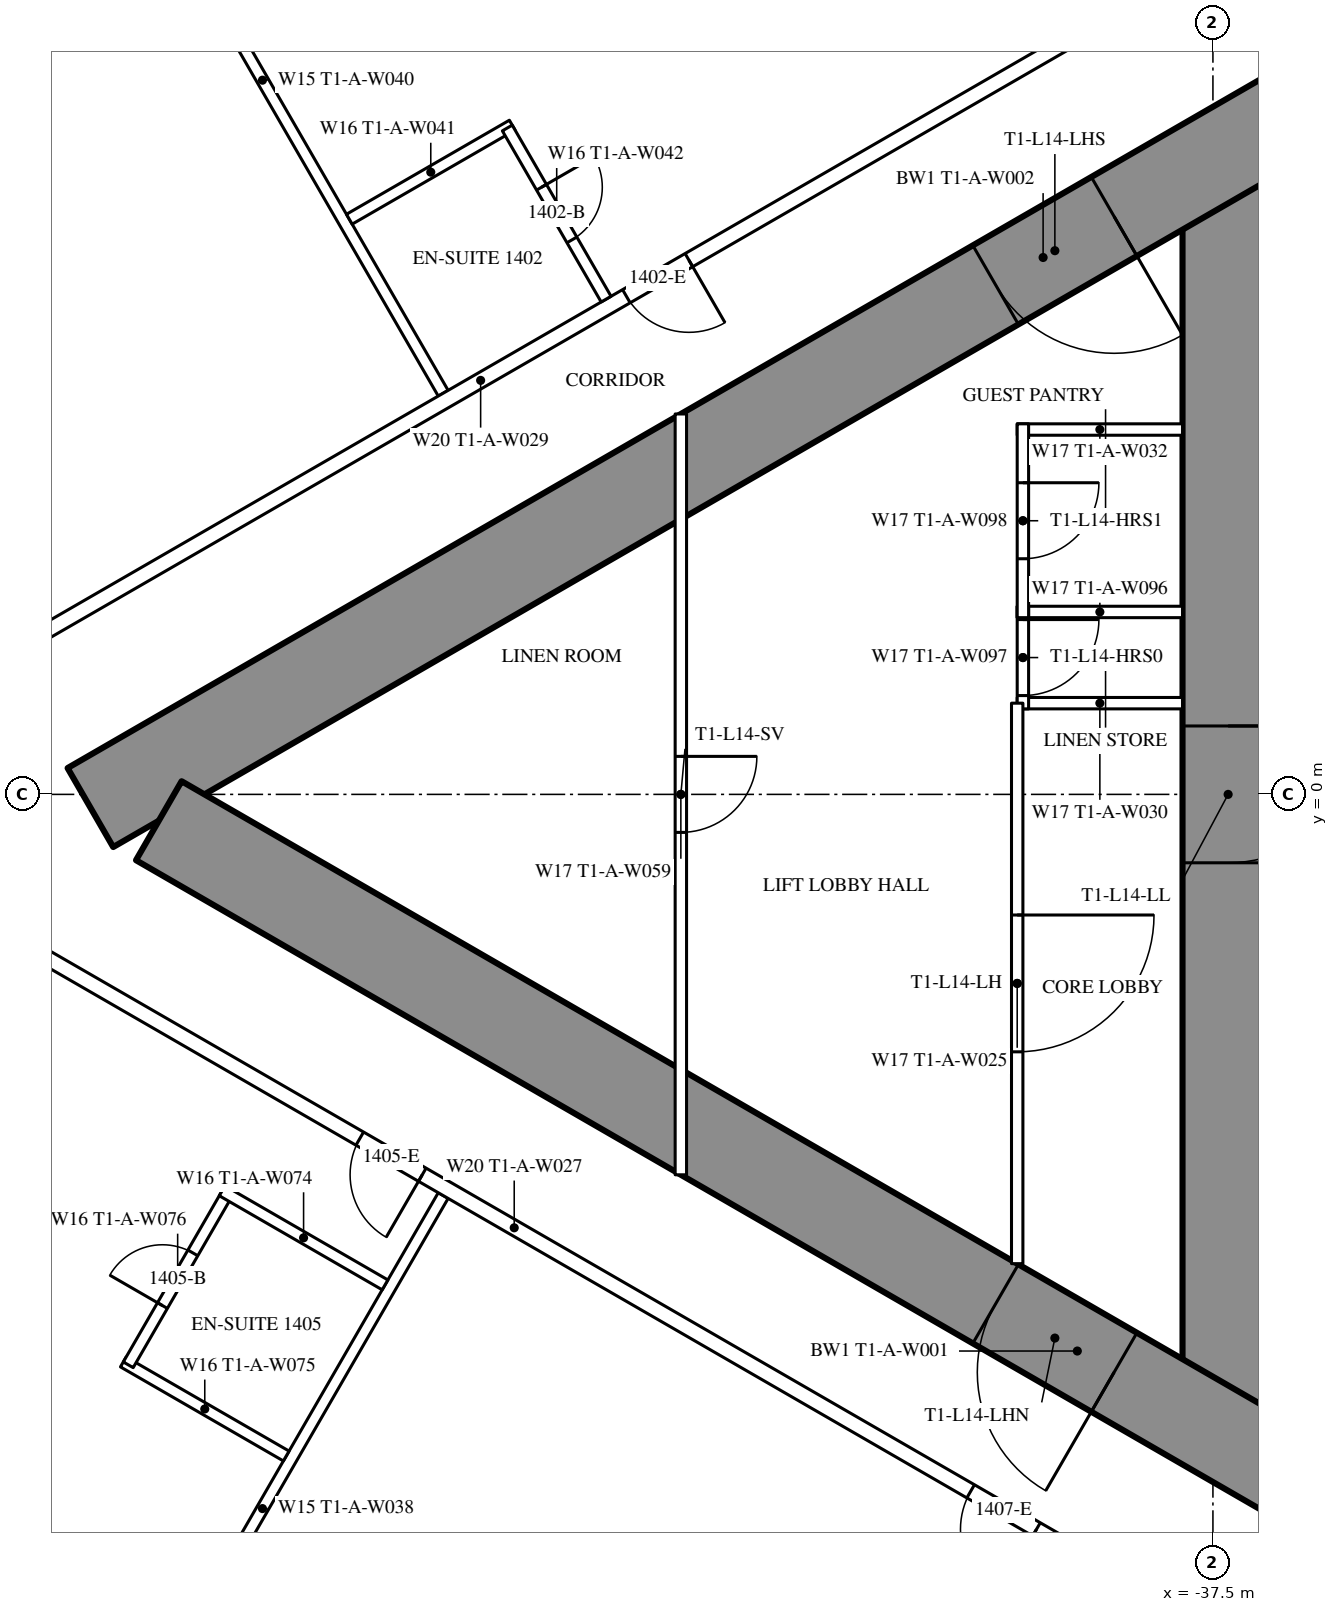
"""IFC4 building model, lengths in metres.
Left out: names, types, materials, properties, quantities, classifications, styles, units other than length and angle.
Written with IfcOpenShell. Run it as: python <this file> out.ifc"""

import sys

from ifc_helpers import new_model, si_unit, direction, frame, frame_2d, origin, place, context, subcontext, project, spatial, rectangle, extrude, element, fill, save


model = new_model("IFC4")
c1 = context("Model", 3, precision=1e-05, world=origin(), true_north=direction((0.0, 1.0)))
c2 = subcontext(c1, "Body", "Model", "MODEL_VIEW")
j1 = project(units=[si_unit("LENGTHUNIT", "METRE"), si_unit("PLANEANGLEUNIT", "RADIAN")], contexts=[c1])
p1 = place(None, origin())
s1 = spatial("IfcSite", under=j1, at=p1, CompositionType="ELEMENT")
p2 = place(p1, origin())
s2 = spatial("IfcBuilding", under=s1, at=p2, CompositionType="ELEMENT")
p3 = place(p2, frame((0.0, 0.0, 56.5)))
s3 = spatial("IfcBuildingStorey", under=s2, at=p3, CompositionType="ELEMENT", Elevation=56.5)
p4 = place(p3, frame((-37.3, 8.6, 0.0), z_axis=(0.0, 0.0, 1.0), x_axis=(0.0, -1.0, 0.0)))
e1 = element("IfcWall", 1, at=p4, inside=s3, PredefinedType="SHEAR", context=c2, shape_type="SweptSolid", body=[
    extrude(rectangle(XDim=17.2, YDim=1.2, at=frame_2d((8.6, 0.0))), origin(), (0.0, 0.0, 1.0), 3.5),
])
p5 = place(p4, frame((7.7, 0.0, 0.0)))
e2 = element("IfcOpeningElement", 2, at=p5, cuts=e1, PredefinedType="OPENING", context=c2, shape_type="SweptSolid", body=[
    extrude(rectangle(XDim=1.8, YDim=2.2, at=frame_2d((0.9, 1.1))), frame((0.0, 0.61, 0.0), z_axis=(0.0, -1.0, 0.0), x_axis=(1.0, 0.0, 0.0)), (0.0, 0.0, 1.0), 1.22),
])
p6 = place(p3, frame((-27.2, 14.3, 0.0), z_axis=(0.0, 0.0, 1.0), x_axis=(-0.866026593062, -0.499997940104, 0.0)))
e3 = element("IfcWall", 3, at=p6, inside=s3, PredefinedType="SHEAR", context=c2, shape_type="SweptSolid", body=[
    extrude(rectangle(XDim=28.946, YDim=1.2, at=frame_2d((14.473, 0.0))), origin(), (0.0, 0.0, 1.0), 3.5),
])
p7 = place(p6, frame((4.6, 0.0, 0.0)))
e4 = element("IfcOpeningElement", 4, at=p7, cuts=e3, PredefinedType="OPENING", context=c2, shape_type="SweptSolid", body=[
    extrude(rectangle(XDim=1.0, YDim=2.2, at=frame_2d((0.5, 1.1))), frame((0.0, 0.61, 0.0), z_axis=(0.0, -1.0, 0.0), x_axis=(1.0, 0.0, 0.0)), (0.0, 0.0, 1.0), 1.22),
])
p8 = place(p6, frame((13.395, 0.0, 0.0)))
e5 = element("IfcOpeningElement", 5, at=p8, cuts=e3, PredefinedType="OPENING", context=c2, shape_type="SweptSolid", body=[
    extrude(rectangle(XDim=1.8, YDim=2.2, at=frame_2d((0.9, 1.1))), frame((0.0, 0.61, 0.0), z_axis=(0.0, -1.0, 0.0), x_axis=(1.0, 0.0, 0.0)), (0.0, 0.0, 1.0), 1.22),
])
p9 = place(p3, frame((-27.2, -14.3, 0.0), z_axis=(0.0, 0.0, 1.0), x_axis=(-0.866024021859, 0.500002393557, 0.0)))
e6 = element("IfcWall", 6, at=p9, inside=s3, PredefinedType="SHEAR", context=c2, shape_type="SweptSolid", body=[
    extrude(rectangle(XDim=27.907, YDim=1.2, at=frame_2d((13.954, 0.0))), origin(), (0.0, 0.0, 1.0), 3.5),
])
p10 = place(p9, frame((4.6, 0.0, 0.0)))
e7 = element("IfcOpeningElement", 7, at=p10, cuts=e6, PredefinedType="OPENING", context=c2, shape_type="SweptSolid", body=[
    extrude(rectangle(XDim=1.0, YDim=2.2, at=frame_2d((0.5, 1.1))), frame((0.0, 0.61, 0.0), z_axis=(0.0, -1.0, 0.0), x_axis=(1.0, 0.0, 0.0)), (0.0, 0.0, 1.0), 1.22),
])
p11 = place(p9, frame((13.395, 0.0, 0.0)))
e8 = element("IfcOpeningElement", 8, at=p11, cuts=e6, PredefinedType="OPENING", context=c2, shape_type="SweptSolid", body=[
    extrude(rectangle(XDim=1.8, YDim=2.2, at=frame_2d((0.9, 1.1))), frame((0.0, 0.61, 0.0), z_axis=(0.0, -1.0, 0.0), x_axis=(1.0, 0.0, 0.0)), (0.0, 0.0, 1.0), 1.22),
])
for number, where, z_axis, x_axis in (
    (9, (-47.627, 5.278, 0.0), (0.0, 0.0, 1.0), (-0.5, 0.866, 0.0)),
    (10, (-47.627, -5.278, 0.0), (0.0, 0.0, 1.0), (-0.5, -0.866, 0.0)),
):
    element("IfcWall", number, at=place(p3, frame(where, z_axis=z_axis, x_axis=x_axis)), inside=s3, PredefinedType="PARTITIONING", context=c2, shape_type="SweptSolid", body=[
        extrude(rectangle(XDim=9.51, YDim=0.15, at=frame_2d((4.755, 0.0))), origin(), (0.0, 0.0, 1.0), 2.25),
    ])
p12 = place(p3, frame((-37.7, 10.894, 0.0), z_axis=(0.0, 0.0, 1.0), x_axis=(-0.866027905338, -0.499995667157, 0.0)))
e11 = element("IfcWall", 11, at=p12, inside=s3, PredefinedType="PARTITIONING", context=c2, shape_type="SweptSolid", body=[
    extrude(rectangle(XDim=21.787, YDim=0.2, at=frame_2d((10.894, 0.0))), origin(), (0.0, 0.0, 1.0), 3.25),
])
p13 = place(p12, frame((20.237, 0.0, 0.0)))
e12 = element("IfcOpeningElement", 12, at=p13, cuts=e11, PredefinedType="OPENING", context=c2, shape_type="SweptSolid", body=[
    extrude(rectangle(XDim=0.95, YDim=2.2, at=frame_2d((0.475, 1.1))), frame((0.0, 0.11, 0.0), z_axis=(0.0, -1.0, 0.0), x_axis=(1.0, 0.0, 0.0)), (0.0, 0.0, 1.0), 0.22),
])
p14 = place(p12, frame((7.73, 0.0, 0.0)))
e13 = element("IfcOpeningElement", 13, at=p14, cuts=e11, PredefinedType="OPENING", context=c2, shape_type="SweptSolid", body=[
    extrude(rectangle(XDim=0.95, YDim=2.2, at=frame_2d((0.475, 1.1))), frame((0.0, 0.11, 0.0), z_axis=(0.0, -1.0, 0.0), x_axis=(1.0, 0.0, 0.0)), (0.0, 0.0, 1.0), 0.22),
])
p15 = place(p3, frame((-36.92, -11.344, 0.0), z_axis=(0.0, 0.0, 1.0), x_axis=(-0.866028313256, 0.499994960614, 0.0)))
e14 = element("IfcWall", 14, at=p15, inside=s3, PredefinedType="PARTITIONING", context=c2, shape_type="SweptSolid", body=[
    extrude(rectangle(XDim=22.568, YDim=0.2, at=frame_2d((11.284, 0.0))), origin(), (0.0, 0.0, 1.0), 3.25),
])
p16 = place(p15, frame((12.68, 0.0, 0.0)))
e15 = element("IfcOpeningElement", 15, at=p16, cuts=e14, PredefinedType="OPENING", context=c2, shape_type="SweptSolid", body=[
    extrude(rectangle(XDim=0.95, YDim=2.2, at=frame_2d((0.475, 1.1))), frame((0.0, 0.11, 0.0), z_axis=(0.0, -1.0, 0.0), x_axis=(1.0, 0.0, 0.0)), (0.0, 0.0, 1.0), 0.22),
])
p17 = place(p15, frame((3.35, 0.0, 0.0)))
e16 = element("IfcOpeningElement", 16, at=p17, cuts=e14, PredefinedType="OPENING", context=c2, shape_type="SweptSolid", body=[
    extrude(rectangle(XDim=1.0, YDim=2.2, at=frame_2d((0.5, 1.1))), frame((0.0, 0.11, 0.0), z_axis=(0.0, -1.0, 0.0), x_axis=(1.0, 0.0, 0.0)), (0.0, 0.0, 1.0), 0.22),
])
p18 = place(p3, frame((-49.692, -8.704, 0.0), z_axis=(0.0, 0.0, 1.0), x_axis=(-0.866073894602, 0.499916002032, 0.0)))
e17 = element("IfcWall", 17, at=p18, inside=s3, PredefinedType="PARTITIONING", context=c2, shape_type="SweptSolid", body=[
    extrude(rectangle(XDim=2.475, YDim=0.15, at=frame_2d((1.238, 0.0))), origin(), (0.0, 0.0, 1.0), 3.25),
])
p19 = place(p3, frame((-50.47, -5.253, 0.0), z_axis=(0.0, 0.0, 1.0), x_axis=(-0.500006934395, -0.866021400173, 0.0)))
e18 = element("IfcWall", 18, at=p19, inside=s3, PredefinedType="PARTITIONING", context=c2, shape_type="SweptSolid", body=[
    extrude(rectangle(XDim=2.6, YDim=0.15, at=frame_2d((1.3, 0.0))), origin(), (0.0, 0.0, 1.0), 3.25),
])
p20 = place(p19, frame((0.9, 0.0, 0.0)))
e19 = element("IfcOpeningElement", 19, at=p20, cuts=e18, PredefinedType="OPENING", context=c2, shape_type="SweptSolid", body=[
    extrude(rectangle(XDim=0.8, YDim=2.2, at=frame_2d((0.4, 1.1))), frame((0.0, 0.085, 0.0), z_axis=(0.0, -1.0, 0.0), x_axis=(1.0, 0.0, 0.0)), (0.0, 0.0, 1.0), 0.17),
])
for number, where, z_axis, x_axis in (
    (20, (-48.392, -6.453, 0.0), (0.0, 0.0, 1.0), (-0.866, 0.5, 0.0)),
    (21, (-46.719, 8.804, 0.0), (0.0, 0.0, 1.0), (-0.866, -0.5, 0.0)),
):
    element("IfcWall", number, at=place(p3, frame(where, z_axis=z_axis, x_axis=x_axis)), inside=s3, PredefinedType="PARTITIONING", context=c2, shape_type="SweptSolid", body=[
        extrude(rectangle(XDim=2.475, YDim=0.15, at=frame_2d((1.237, 0.0))), origin(), (0.0, 0.0, 1.0), 3.25),
    ])
p21 = place(p3, frame((-45.483, 6.515, 0.0), z_axis=(0.0, 0.0, 1.0), x_axis=(-0.500006934395, 0.866021400173, 0.0)))
e22 = element("IfcWall", 22, at=p21, inside=s3, PredefinedType="PARTITIONING", context=c2, shape_type="SweptSolid", body=[
    extrude(rectangle(XDim=2.6, YDim=0.15, at=frame_2d((1.3, 0.0))), origin(), (0.0, 0.0, 1.0), 3.25),
])
p22 = place(p21, frame((0.9, 0.0, 0.0)))
e23 = element("IfcOpeningElement", 23, at=p22, cuts=e22, PredefinedType="OPENING", context=c2, shape_type="SweptSolid", body=[
    extrude(rectangle(XDim=0.8, YDim=2.2, at=frame_2d((0.4, 1.1))), frame((0.0, 0.085, 0.0), z_axis=(0.0, -1.0, 0.0), x_axis=(1.0, 0.0, 0.0)), (0.0, 0.0, 1.0), 0.17),
])
for number, where, z_axis, x_axis in (
    (24, (-37.9, 1.2, 0.0), (0.0, 0.0, 1.0), (-1.0, 0.0, 0.0)),
    (25, (-37.9, 2.4, 0.0), (0.0, 0.0, 1.0), (-1.0, 0.0, 0.0)),
    (26, (-37.9, 4.8, 0.0), (0.0, 0.0, 1.0), (-1.0, 0.0, 0.0)),
):
    element("IfcWall", number, at=place(p3, frame(where, z_axis=z_axis, x_axis=x_axis)), inside=s3, PredefinedType="PARTITIONING", context=c2, shape_type="SweptSolid", body=[
        extrude(rectangle(XDim=2.175, YDim=0.15, at=frame_2d((1.087, 0.0))), origin(), (0.0, 0.0, 1.0), 3.25),
    ])
p23 = place(p3, frame((-40.0, 2.475, 0.0), z_axis=(0.0, 0.0, 1.0), x_axis=(0.0, -1.0, 0.0)))
e27 = element("IfcWall", 27, at=p23, inside=s3, PredefinedType="PARTITIONING", context=c2, shape_type="SweptSolid", body=[
    extrude(rectangle(XDim=1.35, YDim=0.15, at=frame_2d((0.675, 0.0))), origin(), (0.0, 0.0, 1.0), 3.25),
])
p24 = place(p23, frame((0.175, 0.0, 0.0)))
e28 = element("IfcOpeningElement", 28, at=p24, cuts=e27, PredefinedType="OPENING", context=c2, shape_type="SweptSolid", body=[
    extrude(rectangle(XDim=1.0, YDim=2.2, at=frame_2d((0.5, 1.1))), frame((0.0, 0.085, 0.0), z_axis=(0.0, -1.0, 0.0), x_axis=(1.0, 0.0, 0.0)), (0.0, 0.0, 1.0), 0.17),
])
p25 = place(p3, frame((-40.0, 4.875, 0.0), z_axis=(0.0, 0.0, 1.0), x_axis=(0.0, -1.0, 0.0)))
e29 = element("IfcWall", 29, at=p25, inside=s3, PredefinedType="PARTITIONING", context=c2, shape_type="SweptSolid", body=[
    extrude(rectangle(XDim=2.55, YDim=0.15, at=frame_2d((1.275, 0.0))), origin(), (0.0, 0.0, 1.0), 3.25),
])
p26 = place(p25, frame((0.775, 0.0, 0.0)))
e30 = element("IfcOpeningElement", 30, at=p26, cuts=e29, PredefinedType="OPENING", context=c2, shape_type="SweptSolid", body=[
    extrude(rectangle(XDim=1.0, YDim=2.2, at=frame_2d((0.5, 1.1))), frame((0.0, 0.085, 0.0), z_axis=(0.0, -1.0, 0.0), x_axis=(1.0, 0.0, 0.0)), (0.0, 0.0, 1.0), 0.17),
])
p27 = place(p3, frame((-40.075, 1.2, 0.0), z_axis=(0.0, 0.0, 1.0), x_axis=(0.0, -1.0, 0.0)))
e31 = element("IfcWall", 31, at=p27, inside=s3, PredefinedType="PARTITIONING", context=c2, shape_type="SweptSolid", body=[
    extrude(rectangle(XDim=7.374, YDim=0.15, at=frame_2d((3.687, 0.0))), origin(), (0.0, 0.0, 1.0), 3.25),
])
p28 = place(p27, frame((2.787, 0.0, 0.0)))
e32 = element("IfcOpeningElement", 32, at=p28, cuts=e31, PredefinedType="OPENING", context=c2, shape_type="SweptSolid", body=[
    extrude(rectangle(XDim=1.8, YDim=2.2, at=frame_2d((0.9, 1.1))), frame((0.0, 0.085, 0.0), z_axis=(0.0, -1.0, 0.0), x_axis=(1.0, 0.0, 0.0)), (0.0, 0.0, 1.0), 0.17),
])
p29 = place(p3, frame((-44.5, 5.005, 0.0), z_axis=(0.0, 0.0, 1.0), x_axis=(0.0, -1.0, 0.0)))
e33 = element("IfcWall", 33, at=p29, inside=s3, PredefinedType="PARTITIONING", context=c2, shape_type="SweptSolid", body=[
    extrude(rectangle(XDim=10.009, YDim=0.15, at=frame_2d((5.005, 0.0))), origin(), (0.0, 0.0, 1.0), 2.45),
])
p30 = place(p29, frame((4.505, 0.0, 0.0)))
e34 = element("IfcOpeningElement", 34, at=p30, cuts=e33, PredefinedType="OPENING", context=c2, shape_type="SweptSolid", body=[
    extrude(rectangle(XDim=1.0, YDim=2.2, at=frame_2d((0.5, 1.1))), frame((0.0, 0.085, 0.0), z_axis=(0.0, -1.0, 0.0), x_axis=(1.0, 0.0, 0.0)), (0.0, 0.0, 1.0), 0.17),
])
p31 = place(p20, origin())
e35 = element("IfcDoor", 35, at=p31, inside=s3, OperationType="SINGLE_SWING_RIGHT", PredefinedType="DOOR", context=c2, shape_type="SweptSolid", body=[
    extrude(rectangle(XDim=0.8, YDim=2.2, at=frame_2d((0.4, 1.1))), frame((0.0, 0.025, 0.0), z_axis=(0.0, -1.0, 0.0), x_axis=(1.0, 0.0, 0.0)), (0.0, 0.0, 1.0), 0.05),
])
fill(e19, e35)
p32 = place(p16, origin())
e36 = element("IfcDoor", 36, at=p32, inside=s3, OperationType="SINGLE_SWING_LEFT", PredefinedType="DOOR", context=c2, shape_type="SweptSolid", body=[
    extrude(rectangle(XDim=0.95, YDim=2.2, at=frame_2d((0.475, 1.1))), frame((0.0, 0.025, 0.0), z_axis=(0.0, -1.0, 0.0), x_axis=(1.0, 0.0, 0.0)), (0.0, 0.0, 1.0), 0.05),
])
fill(e15, e36)
p33 = place(p17, origin())
e37 = element("IfcDoor", 37, at=p33, inside=s3, OperationType="SINGLE_SWING_LEFT", PredefinedType="DOOR", context=c2, shape_type="SweptSolid", body=[
    extrude(rectangle(XDim=1.0, YDim=2.2, at=frame_2d((0.5, 1.1))), frame((0.0, 0.025, 0.0), z_axis=(0.0, -1.0, 0.0), x_axis=(1.0, 0.0, 0.0)), (0.0, 0.0, 1.0), 0.05),
])
fill(e16, e37)
p34 = place(p22, origin())
e38 = element("IfcDoor", 38, at=p34, inside=s3, OperationType="SINGLE_SWING_RIGHT", PredefinedType="DOOR", context=c2, shape_type="SweptSolid", body=[
    extrude(rectangle(XDim=0.8, YDim=2.2, at=frame_2d((0.4, 1.1))), frame((0.0, 0.025, 0.0), z_axis=(0.0, -1.0, 0.0), x_axis=(1.0, 0.0, 0.0)), (0.0, 0.0, 1.0), 0.05),
])
fill(e23, e38)
p35 = place(p14, origin())
e39 = element("IfcDoor", 39, at=p35, inside=s3, OperationType="SINGLE_SWING_LEFT", PredefinedType="DOOR", context=c2, shape_type="SweptSolid", body=[
    extrude(rectangle(XDim=0.95, YDim=2.2, at=frame_2d((0.475, 1.1))), frame((0.0, 0.025, 0.0), z_axis=(0.0, -1.0, 0.0), x_axis=(1.0, 0.0, 0.0)), (0.0, 0.0, 1.0), 0.05),
])
fill(e13, e39)
p36 = place(p24, origin())
e40 = element("IfcDoor", 40, at=p36, inside=s3, OperationType="SINGLE_SWING_LEFT", PredefinedType="DOOR", context=c2, shape_type="SweptSolid", body=[
    extrude(rectangle(XDim=1.0, YDim=2.2, at=frame_2d((0.5, 1.1))), frame((0.0, 0.025, 0.0), z_axis=(0.0, -1.0, 0.0), x_axis=(1.0, 0.0, 0.0)), (0.0, 0.0, 1.0), 0.05),
])
fill(e28, e40)
p37 = place(p26, origin())
e41 = element("IfcDoor", 41, at=p37, inside=s3, OperationType="SINGLE_SWING_LEFT", PredefinedType="DOOR", context=c2, shape_type="SweptSolid", body=[
    extrude(rectangle(XDim=1.0, YDim=2.2, at=frame_2d((0.5, 1.1))), frame((0.0, 0.025, 0.0), z_axis=(0.0, -1.0, 0.0), x_axis=(1.0, 0.0, 0.0)), (0.0, 0.0, 1.0), 0.05),
])
fill(e30, e41)
p38 = place(p28, origin())
e42 = element("IfcDoor", 42, at=p38, inside=s3, OperationType="DOUBLE_DOOR_SINGLE_SWING", PredefinedType="DOOR", context=c2, shape_type="SweptSolid", body=[
    extrude(rectangle(XDim=1.8, YDim=2.2, at=frame_2d((0.9, 1.1))), frame((0.0, 0.025, 0.0), z_axis=(0.0, -1.0, 0.0), x_axis=(1.0, 0.0, 0.0)), (0.0, 0.0, 1.0), 0.05),
])
fill(e32, e42)
p39 = place(p30, origin())
e43 = element("IfcDoor", 43, at=p39, inside=s3, OperationType="SINGLE_SWING_LEFT", PredefinedType="DOOR", context=c2, shape_type="SweptSolid", body=[
    extrude(rectangle(XDim=1.0, YDim=2.2, at=frame_2d((0.5, 1.1))), frame((0.0, 0.025, 0.0), z_axis=(0.0, -1.0, 0.0), x_axis=(1.0, 0.0, 0.0)), (0.0, 0.0, 1.0), 0.05),
])
fill(e34, e43)
p40 = place(p8, origin())
e44 = element("IfcDoor", 44, at=p40, inside=s3, OperationType="DOUBLE_DOOR_SINGLE_SWING", PredefinedType="DOOR", context=c2, shape_type="SweptSolid", body=[
    extrude(rectangle(XDim=1.8, YDim=2.2, at=frame_2d((0.9, 1.1))), frame((0.0, 0.025, 0.0), z_axis=(0.0, -1.0, 0.0), x_axis=(1.0, 0.0, 0.0)), (0.0, 0.0, 1.0), 0.05),
])
fill(e5, e44)
p41 = place(p11, origin())
e45 = element("IfcDoor", 45, at=p41, inside=s3, OperationType="DOUBLE_DOOR_SINGLE_SWING", PredefinedType="DOOR", context=c2, shape_type="SweptSolid", body=[
    extrude(rectangle(XDim=1.8, YDim=2.2, at=frame_2d((0.9, 1.1))), frame((0.0, 0.025, 0.0), z_axis=(0.0, -1.0, 0.0), x_axis=(1.0, 0.0, 0.0)), (0.0, 0.0, 1.0), 0.05),
])
fill(e8, e45)
p42 = place(p5, origin())
e46 = element("IfcDoor", 46, at=p42, inside=s3, OperationType="DOUBLE_DOOR_SINGLE_SWING", PredefinedType="DOOR", context=c2, shape_type="SweptSolid", body=[
    extrude(rectangle(XDim=1.8, YDim=2.2, at=frame_2d((0.9, 1.1))), frame((0.0, 0.025, 0.0), z_axis=(0.0, -1.0, 0.0), x_axis=(1.0, 0.0, 0.0)), (0.0, 0.0, 1.0), 0.05),
])
fill(e2, e46)
save(model, sys.argv[1])
